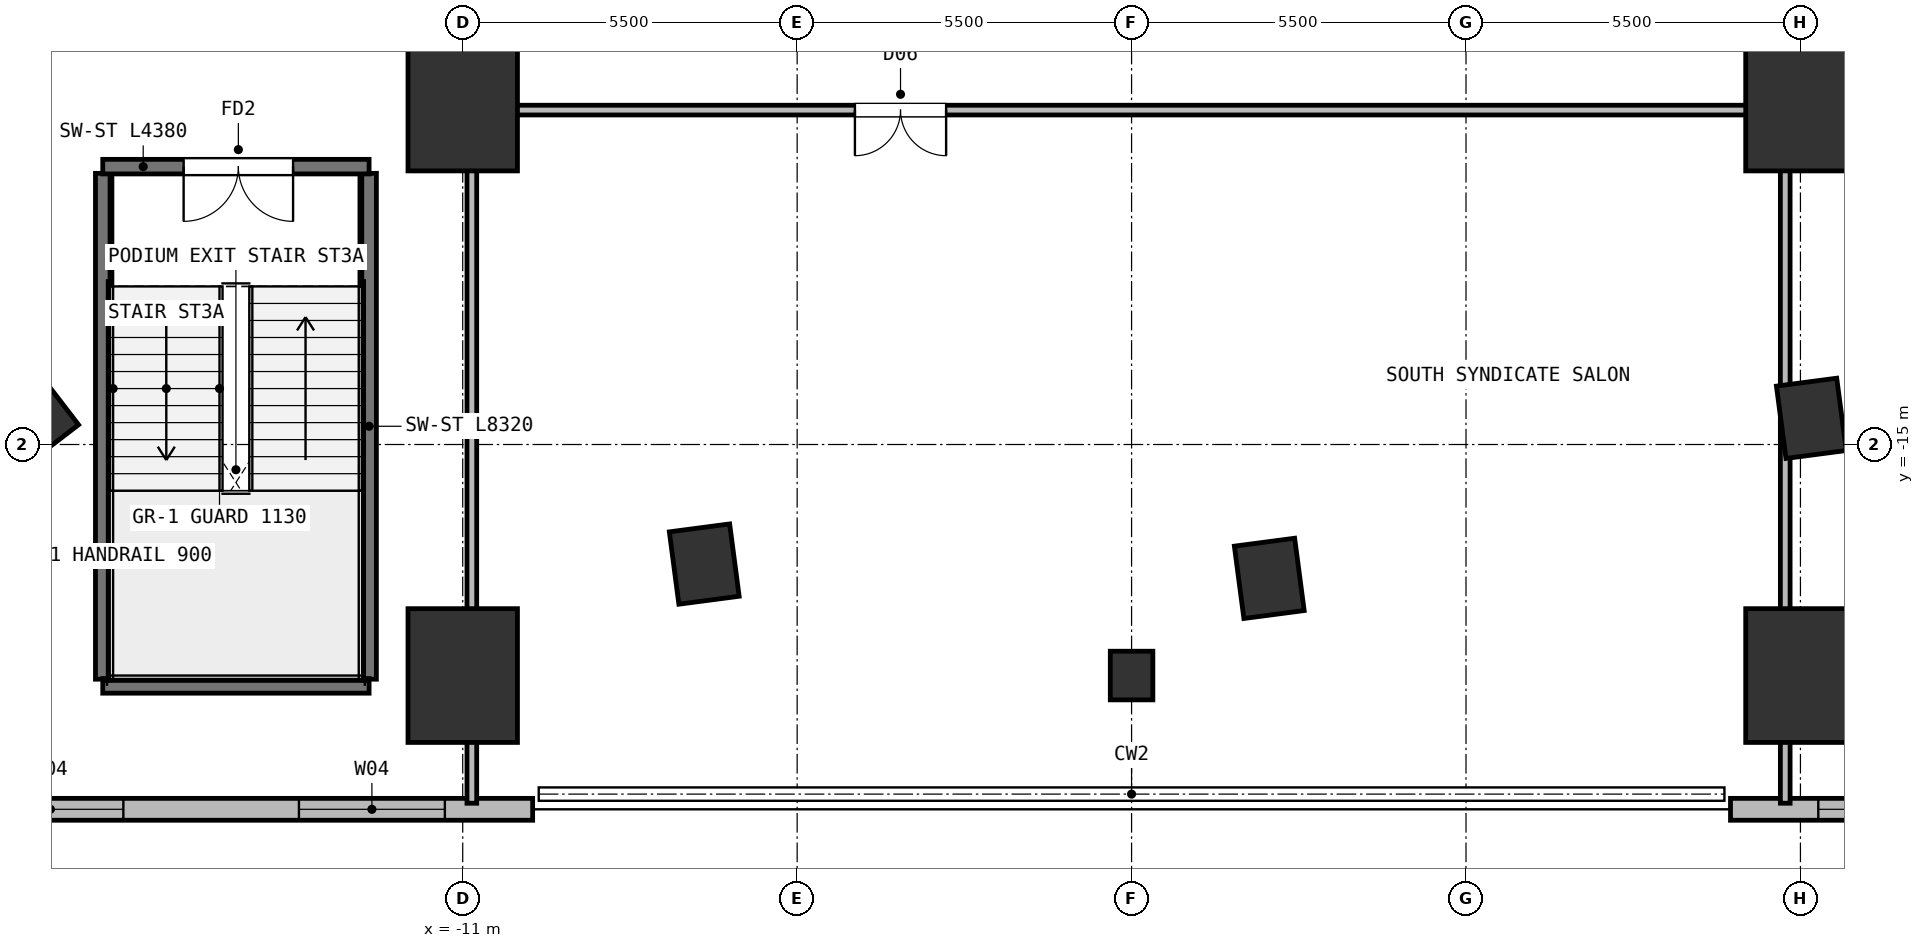
"""IFC4 building model, lengths in metres.
Left out: names, types, materials, properties, quantities, classifications, styles, units other than length and angle.
Written with IfcOpenShell. Run it as: python <this file> out.ifc"""

import sys

from ifc_helpers import new_model, si_unit, direction, frame, frame_2d, origin, origin_2d, place, context, subcontext, project, spatial, rectangle, extrude, element, fill, save


model = new_model("IFC4")
c1 = context("Model", 3, precision=1e-05, world=origin(), true_north=direction((0.0, 1.0)))
c2 = subcontext(c1, "Body", "Model", "MODEL_VIEW")
j1 = project(units=[si_unit("LENGTHUNIT", "METRE"), si_unit("PLANEANGLEUNIT", "RADIAN")], contexts=[c1])
p1 = place(None, origin())
s1 = spatial("IfcSite", under=j1, at=p1, CompositionType="ELEMENT")
p2 = place(p1, origin())
s2 = spatial("IfcBuilding", under=s1, at=p2, CompositionType="ELEMENT")
p3 = place(p2, frame((0.0, 0.0, 21.5)))
s3 = spatial("IfcBuildingStorey", under=s2, at=p3, CompositionType="ELEMENT", Elevation=21.5)
p4 = place(p3, frame((-18.702, -14.351, 0.0), z_axis=(0.0, 0.0, 1.0), x_axis=(0.793353340291, 0.608761429009, 0.0)))
e1 = element("IfcColumn", 1, at=p4, inside=s3, PredefinedType="COLUMN", context=c2, shape_type="SweptSolid", body=[
    extrude(rectangle(XDim=1.8, YDim=2.2, at=origin_2d()), origin(), (0.0, 0.0, 1.0), 4.5),
])
for number, where, z_axis, x_axis in (
    (2, (-7.028, -16.966, 0.0), (0.0, 0.0, 1.0), (0.991, 0.131, 0.0)),
    (3, (2.265, -17.202, 0.0), (0.0, 0.0, 1.0), (0.991, 0.131, 0.0)),
    (4, (11.179, -14.569, 0.0), (0.0, 0.0, 1.0), (0.991, 0.131, 0.0)),
):
    element("IfcColumn", number, at=place(p3, frame(where, z_axis=z_axis, x_axis=x_axis)), inside=s3, PredefinedType="COLUMN", context=c2, shape_type="SweptSolid", body=[
        extrude(rectangle(XDim=1.0, YDim=1.2, at=origin_2d()), origin(), (0.0, 0.0, 1.0), 4.5),
    ])
for number, where, z_axis, x_axis in (
    (5, (-11.0, -18.8, 0.0), (0.0, 0.0, 1.0), (1.0, 0.0, 0.0)),
    (6, (-11.0, -9.4, 0.0), (0.0, 0.0, 1.0), (1.0, 0.0, 0.0)),
    (7, (11.0, -18.8, 0.0), (0.0, 0.0, 1.0), (1.0, 0.0, 0.0)),
    (8, (11.0, -9.4, 0.0), (0.0, 0.0, 1.0), (1.0, 0.0, 0.0)),
):
    element("IfcColumn", number, at=place(p3, frame(where, z_axis=z_axis, x_axis=x_axis)), inside=s3, PredefinedType="COLUMN", context=c2, shape_type="SweptSolid", body=[
        extrude(rectangle(XDim=1.8, YDim=2.2, at=origin_2d()), origin(), (0.0, 0.0, 1.0), 4.5),
    ])
p5 = place(p3, frame((0.0, -18.8, 0.0), z_axis=(0.0, 0.0, 1.0), x_axis=(1.0, 0.0, 0.0)))
e9 = element("IfcColumn", 9, at=p5, inside=s3, PredefinedType="COLUMN", context=c2, shape_type="SweptSolid", body=[
    extrude(rectangle(XDim=0.7, YDim=0.8, at=origin_2d()), origin(), (0.0, 0.0, 1.0), 4.5),
])
p6 = place(p3, frame((-9.85, -21.0, 0.0), z_axis=(0.0, 0.0, 1.0), x_axis=(-1.0, 0.0, 0.0)))
e10 = element("IfcWall", 10, at=p6, inside=s3, PredefinedType="SOLIDWALL", context=c2, shape_type="SweptSolid", body=[
    extrude(rectangle(XDim=21.15, YDim=0.36, at=frame_2d((10.575, 0.0))), origin(), (0.0, 0.0, 1.0), 4.22),
])
p7 = place(p6, frame((1.444, 0.0, 0.95)))
e11 = element("IfcOpeningElement", 11, at=p7, cuts=e10, PredefinedType="OPENING", context=c2, shape_type="SweptSolid", body=[
    extrude(rectangle(XDim=2.4, YDim=2.6, at=frame_2d((1.2, 1.3))), frame((0.0, 0.19, 0.0), z_axis=(0.0, -1.0, 0.0), x_axis=(1.0, 0.0, 0.0)), (0.0, 0.0, 1.0), 0.38),
])
p8 = place(p6, frame((6.731, 0.0, 0.95)))
e12 = element("IfcOpeningElement", 12, at=p8, cuts=e10, PredefinedType="OPENING", context=c2, shape_type="SweptSolid", body=[
    extrude(rectangle(XDim=2.4, YDim=2.6, at=frame_2d((1.2, 1.3))), frame((0.0, 0.19, 0.0), z_axis=(0.0, -1.0, 0.0), x_axis=(1.0, 0.0, 0.0)), (0.0, 0.0, 1.0), 0.38),
])
p9 = place(p6, frame((12.019, 0.0, 0.95)))
e13 = element("IfcOpeningElement", 13, at=p9, cuts=e10, PredefinedType="OPENING", context=c2, shape_type="SweptSolid", body=[
    extrude(rectangle(XDim=2.4, YDim=2.6, at=frame_2d((1.2, 1.3))), frame((0.0, 0.19, 0.0), z_axis=(0.0, -1.0, 0.0), x_axis=(1.0, 0.0, 0.0)), (0.0, 0.0, 1.0), 0.38),
])
p10 = place(p6, frame((17.306, 0.0, 0.95)))
e14 = element("IfcOpeningElement", 14, at=p10, cuts=e10, PredefinedType="OPENING", context=c2, shape_type="SweptSolid", body=[
    extrude(rectangle(XDim=2.4, YDim=2.6, at=frame_2d((1.2, 1.3))), frame((0.0, 0.19, 0.0), z_axis=(0.0, -1.0, 0.0), x_axis=(1.0, 0.0, 0.0)), (0.0, 0.0, 1.0), 0.38),
])
p11 = place(p3, frame((31.0, -21.0, 0.0), z_axis=(0.0, 0.0, 1.0), x_axis=(-1.0, 0.0, 0.0)))
e15 = element("IfcWall", 15, at=p11, inside=s3, PredefinedType="SOLIDWALL", context=c2, shape_type="SweptSolid", body=[
    extrude(rectangle(XDim=21.15, YDim=0.36, at=frame_2d((10.575, 0.0))), origin(), (0.0, 0.0, 1.0), 4.22),
])
p12 = place(p11, frame((1.444, 0.0, 0.95)))
e16 = element("IfcOpeningElement", 16, at=p12, cuts=e15, PredefinedType="OPENING", context=c2, shape_type="SweptSolid", body=[
    extrude(rectangle(XDim=2.4, YDim=2.6, at=frame_2d((1.2, 1.3))), frame((0.0, 0.19, 0.0), z_axis=(0.0, -1.0, 0.0), x_axis=(1.0, 0.0, 0.0)), (0.0, 0.0, 1.0), 0.38),
])
p13 = place(p11, frame((6.731, 0.0, 0.95)))
e17 = element("IfcOpeningElement", 17, at=p13, cuts=e15, PredefinedType="OPENING", context=c2, shape_type="SweptSolid", body=[
    extrude(rectangle(XDim=2.4, YDim=2.6, at=frame_2d((1.2, 1.3))), frame((0.0, 0.19, 0.0), z_axis=(0.0, -1.0, 0.0), x_axis=(1.0, 0.0, 0.0)), (0.0, 0.0, 1.0), 0.38),
])
p14 = place(p11, frame((12.019, 0.0, 0.95)))
e18 = element("IfcOpeningElement", 18, at=p14, cuts=e15, PredefinedType="OPENING", context=c2, shape_type="SweptSolid", body=[
    extrude(rectangle(XDim=2.4, YDim=2.6, at=frame_2d((1.2, 1.3))), frame((0.0, 0.19, 0.0), z_axis=(0.0, -1.0, 0.0), x_axis=(1.0, 0.0, 0.0)), (0.0, 0.0, 1.0), 0.38),
])
p15 = place(p11, frame((17.306, 0.0, 0.95)))
e19 = element("IfcOpeningElement", 19, at=p15, cuts=e15, PredefinedType="OPENING", context=c2, shape_type="SweptSolid", body=[
    extrude(rectangle(XDim=2.4, YDim=2.6, at=frame_2d((1.2, 1.3))), frame((0.0, 0.19, 0.0), z_axis=(0.0, -1.0, 0.0), x_axis=(1.0, 0.0, 0.0)), (0.0, 0.0, 1.0), 0.38),
])
for number, where, z_axis, x_axis in (
    (20, (-16.92, -18.86, 0.0), (0.0, 0.0, 1.0), (0.0, 1.0, 0.0)),
    (21, (-12.54, -18.86, 0.0), (0.0, 0.0, 1.0), (0.0, 1.0, 0.0)),
):
    element("IfcWall", number, at=place(p3, frame(where, z_axis=z_axis, x_axis=x_axis)), inside=s3, PredefinedType="SHEAR", context=c2, shape_type="SweptSolid", body=[
        extrude(rectangle(XDim=8.32, YDim=0.24, at=frame_2d((4.16, 0.0))), origin(), (0.0, 0.0, 1.0), 4.22),
    ])
p16 = place(p3, frame((-16.92, -18.97, 0.0), z_axis=(0.0, 0.0, 1.0), x_axis=(1.0, 0.0, 0.0)))
e22 = element("IfcWall", 22, at=p16, inside=s3, PredefinedType="SHEAR", context=c2, shape_type="SweptSolid", body=[
    extrude(rectangle(XDim=4.38, YDim=0.24, at=frame_2d((2.19, 0.0))), origin(), (0.0, 0.0, 1.0), 4.22),
])
p17 = place(p3, frame((-12.54, -10.43, 0.0), z_axis=(0.0, 0.0, 1.0), x_axis=(-1.0, 0.0, 0.0)))
e23 = element("IfcWall", 23, at=p17, inside=s3, PredefinedType="SHEAR", context=c2, shape_type="SweptSolid", body=[
    extrude(rectangle(XDim=4.38, YDim=0.24, at=frame_2d((2.19, 0.0))), origin(), (0.0, 0.0, 1.0), 4.22),
])
p18 = place(p17, frame((1.25, 0.0, 0.0)))
e24 = element("IfcOpeningElement", 24, at=p18, cuts=e23, PredefinedType="OPENING", context=c2, shape_type="SweptSolid", body=[
    extrude(rectangle(XDim=1.8, YDim=2.2, at=frame_2d((0.9, 1.1))), frame((0.0, 0.13, 0.0), z_axis=(0.0, -1.0, 0.0), x_axis=(1.0, 0.0, 0.0)), (0.0, 0.0, 1.0), 0.26),
])
p19 = place(p3, frame((-10.85, -20.9, 0.0), z_axis=(0.0, 0.0, 1.0), x_axis=(0.0, 1.0, 0.0)))
e25 = element("IfcWall", 25, at=p19, inside=s3, PredefinedType="PARTITIONING", context=c2, shape_type="SweptSolid", body=[
    extrude(rectangle(XDim=22.6, YDim=0.16, at=frame_2d((11.3, 0.0))), origin(), (0.0, 0.0, 1.0), 3.6),
])
p20 = place(p19, frame((17.35, 0.0, 0.0)))
e26 = element("IfcOpeningElement", 26, at=p20, cuts=e25, PredefinedType="OPENING", context=c2, shape_type="SweptSolid", body=[
    extrude(rectangle(XDim=1.5, YDim=2.2, at=frame_2d((0.75, 1.1))), frame((0.0, 0.09, 0.0), z_axis=(0.0, -1.0, 0.0), x_axis=(1.0, 0.0, 0.0)), (0.0, 0.0, 1.0), 0.18),
])
p21 = place(p3, frame((10.75, -9.5, 0.0), z_axis=(0.0, 0.0, 1.0), x_axis=(-1.0, 0.0, 0.0)))
e27 = element("IfcWall", 27, at=p21, inside=s3, PredefinedType="PARTITIONING", context=c2, shape_type="SweptSolid", body=[
    extrude(rectangle(XDim=21.5, YDim=0.16, at=frame_2d((10.75, 0.0))), origin(), (0.0, 0.0, 1.0), 3.3),
])
p22 = place(p21, frame((13.8, 0.0, 0.0)))
e28 = element("IfcOpeningElement", 28, at=p22, cuts=e27, PredefinedType="OPENING", context=c2, shape_type="SweptSolid", body=[
    extrude(rectangle(XDim=1.5, YDim=2.2, at=frame_2d((0.75, 1.1))), frame((0.0, 0.09, 0.0), z_axis=(0.0, -1.0, 0.0), x_axis=(1.0, 0.0, 0.0)), (0.0, 0.0, 1.0), 0.18),
])
p23 = place(p3, frame((10.75, -20.9, 0.0), z_axis=(0.0, 0.0, 1.0), x_axis=(0.0, 1.0, 0.0)))
e29 = element("IfcWall", 29, at=p23, inside=s3, PredefinedType="PARTITIONING", context=c2, shape_type="SweptSolid", body=[
    extrude(rectangle(XDim=11.3, YDim=0.16, at=frame_2d((5.65, 0.0))), origin(), (0.0, 0.0, 1.0), 4.22),
])
p24 = place(p7, origin())
e30 = element("IfcWindow", 30, at=p24, inside=s3, PartitioningType="SINGLE_PANEL", PredefinedType="WINDOW", context=c2, shape_type="SweptSolid", body=[
    extrude(rectangle(XDim=2.4, YDim=2.6, at=frame_2d((1.2, 1.3))), frame((0.0, 0.03, 0.0), z_axis=(0.0, -1.0, 0.0), x_axis=(1.0, 0.0, 0.0)), (0.0, 0.0, 1.0), 0.06),
])
fill(e11, e30)
p25 = place(p8, origin())
e31 = element("IfcWindow", 31, at=p25, inside=s3, PartitioningType="SINGLE_PANEL", PredefinedType="WINDOW", context=c2, shape_type="SweptSolid", body=[
    extrude(rectangle(XDim=2.4, YDim=2.6, at=frame_2d((1.2, 1.3))), frame((0.0, 0.03, 0.0), z_axis=(0.0, -1.0, 0.0), x_axis=(1.0, 0.0, 0.0)), (0.0, 0.0, 1.0), 0.06),
])
fill(e12, e31)
p26 = place(p15, origin())
e32 = element("IfcWindow", 32, at=p26, inside=s3, PartitioningType="SINGLE_PANEL", PredefinedType="WINDOW", context=c2, shape_type="SweptSolid", body=[
    extrude(rectangle(XDim=2.4, YDim=2.6, at=frame_2d((1.2, 1.3))), frame((0.0, 0.03, 0.0), z_axis=(0.0, -1.0, 0.0), x_axis=(1.0, 0.0, 0.0)), (0.0, 0.0, 1.0), 0.06),
])
fill(e19, e32)
p27 = place(p18, origin())
e33 = element("IfcDoor", 33, at=p27, inside=s3, OperationType="DOUBLE_DOOR_SINGLE_SWING", PredefinedType="DOOR", context=c2, shape_type="SweptSolid", body=[
    extrude(rectangle(XDim=1.8, YDim=2.2, at=frame_2d((0.9, 1.1))), frame((0.0, 0.025, 0.0), z_axis=(0.0, -1.0, 0.0), x_axis=(1.0, 0.0, 0.0)), (0.0, 0.0, 1.0), 0.05),
])
fill(e24, e33)
p28 = place(p22, origin())
e34 = element("IfcDoor", 34, at=p28, inside=s3, OperationType="DOUBLE_DOOR_SINGLE_SWING", PredefinedType="DOOR", context=c2, shape_type="SweptSolid", body=[
    extrude(rectangle(XDim=1.5, YDim=2.2, at=frame_2d((0.75, 1.1))), frame((0.0, 0.025, 0.0), z_axis=(0.0, -1.0, 0.0), x_axis=(1.0, 0.0, 0.0)), (0.0, 0.0, 1.0), 0.05),
])
fill(e28, e34)
save(model, sys.argv[1])
